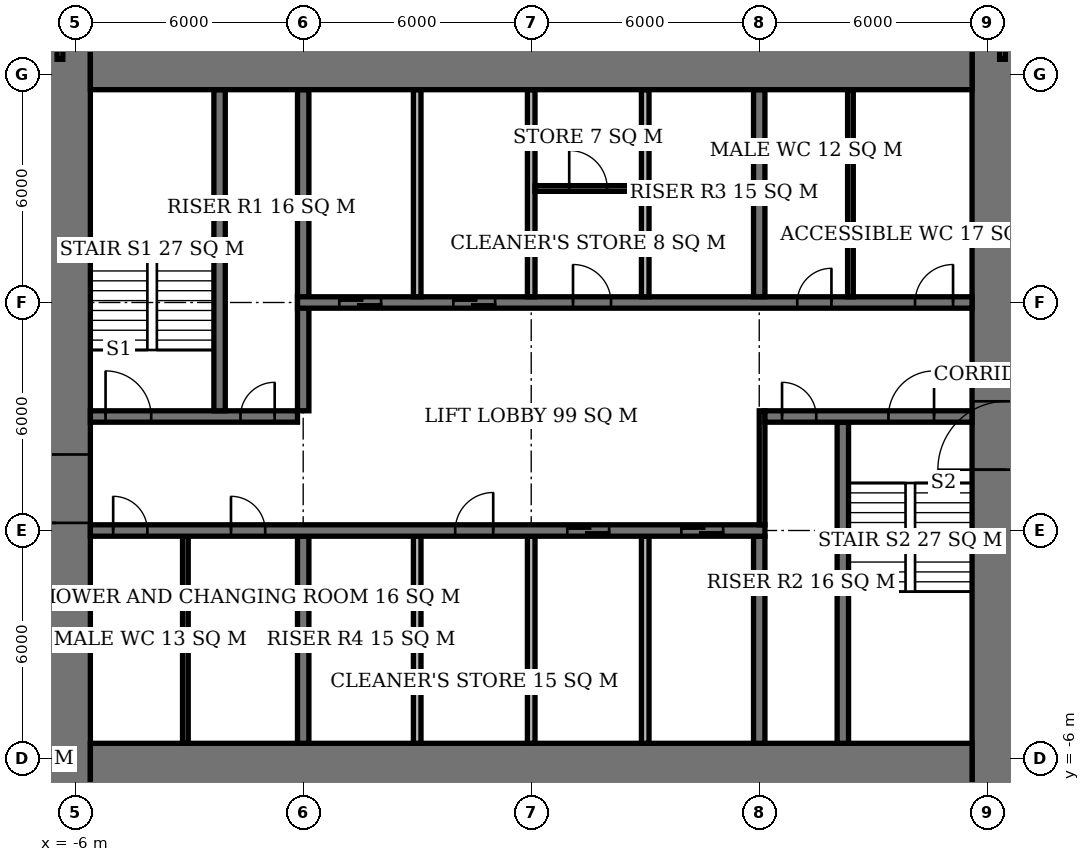
"""IFC4 building model, lengths in metres.
Left out: names, types, materials, properties, quantities, classifications, styles, units other than length and angle.
Written with IfcOpenShell. Run it as: python <this file> out.ifc"""

import sys

from ifc_helpers import new_model, si_unit, direction, frame, frame_2d, origin, place, context, subcontext, project, spatial, rectangle, extrude, element, fill, save


model = new_model("IFC4")
c1 = context("Model", 3, precision=1e-05, world=origin(), true_north=direction((0.0, 1.0)))
c2 = subcontext(c1, "Body", "Model", "MODEL_VIEW")
j1 = project(units=[si_unit("LENGTHUNIT", "METRE"), si_unit("PLANEANGLEUNIT", "RADIAN")], contexts=[c1])
p1 = place(None, origin())
s1 = spatial("IfcSite", under=j1, at=p1, CompositionType="ELEMENT")
p2 = place(p1, origin())
s2 = spatial("IfcBuilding", under=s1, at=p2, CompositionType="ELEMENT")
p3 = place(p2, frame((0.0, 0.0, 231.8)))
s3 = spatial("IfcBuildingStorey", under=s2, at=p3, CompositionType="ELEMENT", Elevation=231.8)
for number, where, z_axis, x_axis in (
    (1, (-5.6, -6.6, 0.0), (0.0, 0.0, 1.0), (1.0, 0.0, 0.0)),
    (2, (-5.6, 12.6, 0.0), (0.0, 0.0, 1.0), (1.0, 0.0, 0.0)),
):
    element("IfcWall", number, at=place(p3, frame(where, z_axis=z_axis, x_axis=x_axis)), inside=s3, PredefinedType="SHEAR", context=c2, shape_type="SweptSolid", body=[
        extrude(rectangle(XDim=23.2, YDim=2.0, at=frame_2d((11.6, 0.0))), origin(), (0.0, 0.0, 1.0), 3.9),
    ])
p4 = place(p3, frame((-6.5, -7.6, 0.0), z_axis=(0.0, 0.0, 1.0), x_axis=(0.0, 1.0, 0.0)))
e3 = element("IfcWall", 3, at=p4, inside=s3, PredefinedType="SHEAR", context=c2, shape_type="SweptSolid", body=[
    extrude(rectangle(XDim=21.2, YDim=1.8, at=frame_2d((10.6, 0.0))), origin(), (0.0, 0.0, 1.0), 3.9),
])
p5 = place(p4, frame((7.8, 0.0, 0.0)))
e4 = element("IfcOpeningElement", 4, at=p5, cuts=e3, PredefinedType="OPENING", context=c2, shape_type="SweptSolid", body=[
    extrude(rectangle(XDim=1.8, YDim=2.4, at=frame_2d((0.9, 1.2))), frame((0.0, 0.91, 0.0), z_axis=(0.0, -1.0, 0.0), x_axis=(1.0, 0.0, 0.0)), (0.0, 0.0, 1.0), 1.82),
])
p6 = place(p3, frame((18.5, -7.6, 0.0), z_axis=(0.0, 0.0, 1.0), x_axis=(0.0, 1.0, 0.0)))
e5 = element("IfcWall", 5, at=p6, inside=s3, PredefinedType="SHEAR", context=c2, shape_type="SweptSolid", body=[
    extrude(rectangle(XDim=21.2, YDim=1.8, at=frame_2d((10.6, 0.0))), origin(), (0.0, 0.0, 1.0), 3.9),
])
p7 = place(p6, frame((9.2, 0.0, 0.0)))
e6 = element("IfcOpeningElement", 6, at=p7, cuts=e5, PredefinedType="OPENING", context=c2, shape_type="SweptSolid", body=[
    extrude(rectangle(XDim=1.8, YDim=2.4, at=frame_2d((0.9, 1.2))), frame((0.0, 0.91, 0.0), z_axis=(0.0, -1.0, 0.0), x_axis=(1.0, 0.0, 0.0)), (0.0, 0.0, 1.0), 1.82),
])
p8 = place(p3, frame((-5.6, 0.0, 0.0), z_axis=(0.0, 0.0, 1.0), x_axis=(1.0, 0.0, 0.0)))
e7 = element("IfcWall", 7, at=p8, inside=s3, PredefinedType="SHEAR", context=c2, shape_type="SweptSolid", body=[
    extrude(rectangle(XDim=17.75, YDim=0.3, at=frame_2d((8.875, 0.0))), origin(), (0.0, 0.0, 1.0), 3.9),
])
p9 = place(p8, frame((0.6, 0.0, 0.0)))
e8 = element("IfcOpeningElement", 8, at=p9, cuts=e7, PredefinedType="OPENING", context=c2, shape_type="SweptSolid", body=[
    extrude(rectangle(XDim=0.9, YDim=2.1, at=frame_2d((0.45, 1.05))), frame((0.0, 0.16, 0.0), z_axis=(0.0, -1.0, 0.0), x_axis=(1.0, 0.0, 0.0)), (0.0, 0.0, 1.0), 0.32),
])
p10 = place(p8, frame((3.7, 0.0, 0.0)))
e9 = element("IfcOpeningElement", 9, at=p10, cuts=e7, PredefinedType="OPENING", context=c2, shape_type="SweptSolid", body=[
    extrude(rectangle(XDim=0.9, YDim=2.1, at=frame_2d((0.45, 1.05))), frame((0.0, 0.16, 0.0), z_axis=(0.0, -1.0, 0.0), x_axis=(1.0, 0.0, 0.0)), (0.0, 0.0, 1.0), 0.32),
])
p11 = place(p8, frame((9.6, 0.0, 0.0)))
e10 = element("IfcOpeningElement", 10, at=p11, cuts=e7, PredefinedType="OPENING", context=c2, shape_type="SweptSolid", body=[
    extrude(rectangle(XDim=1.0, YDim=2.1, at=frame_2d((0.5, 1.05))), frame((0.0, 0.16, 0.0), z_axis=(0.0, -1.0, 0.0), x_axis=(1.0, 0.0, 0.0)), (0.0, 0.0, 1.0), 0.32),
])
p12 = place(p8, frame((12.55, 0.0, 0.0)))
e11 = element("IfcOpeningElement", 11, at=p12, cuts=e7, PredefinedType="OPENING", context=c2, shape_type="SweptSolid", body=[
    extrude(rectangle(XDim=1.1, YDim=2.1, at=frame_2d((0.55, 1.05))), frame((0.0, 0.16, 0.0), z_axis=(0.0, -1.0, 0.0), x_axis=(1.0, 0.0, 0.0)), (0.0, 0.0, 1.0), 0.32),
])
p13 = place(p8, frame((15.55, 0.0, 0.0)))
e12 = element("IfcOpeningElement", 12, at=p13, cuts=e7, PredefinedType="OPENING", context=c2, shape_type="SweptSolid", body=[
    extrude(rectangle(XDim=1.1, YDim=2.1, at=frame_2d((0.55, 1.05))), frame((0.0, 0.16, 0.0), z_axis=(0.0, -1.0, 0.0), x_axis=(1.0, 0.0, 0.0)), (0.0, 0.0, 1.0), 0.32),
])
p14 = place(p3, frame((-5.6, 3.0, 0.0), z_axis=(0.0, 0.0, 1.0), x_axis=(1.0, 0.0, 0.0)))
e13 = element("IfcWall", 13, at=p14, inside=s3, PredefinedType="SHEAR", context=c2, shape_type="SweptSolid", body=[
    extrude(rectangle(XDim=5.45, YDim=0.3, at=frame_2d((2.725, 0.0))), origin(), (0.0, 0.0, 1.0), 3.9),
])
p15 = place(p14, frame((0.4, 0.0, 0.0)))
e14 = element("IfcOpeningElement", 14, at=p15, cuts=e13, PredefinedType="OPENING", context=c2, shape_type="SweptSolid", body=[
    extrude(rectangle(XDim=1.2, YDim=2.1, at=frame_2d((0.6, 1.05))), frame((0.0, 0.16, 0.0), z_axis=(0.0, -1.0, 0.0), x_axis=(1.0, 0.0, 0.0)), (0.0, 0.0, 1.0), 0.32),
])
p16 = place(p14, frame((3.95, 0.0, 0.0)))
e15 = element("IfcOpeningElement", 15, at=p16, cuts=e13, PredefinedType="OPENING", context=c2, shape_type="SweptSolid", body=[
    extrude(rectangle(XDim=0.9, YDim=2.1, at=frame_2d((0.45, 1.05))), frame((0.0, 0.16, 0.0), z_axis=(0.0, -1.0, 0.0), x_axis=(1.0, 0.0, 0.0)), (0.0, 0.0, 1.0), 0.32),
])
p17 = place(p3, frame((12.15, 3.0, 0.0), z_axis=(0.0, 0.0, 1.0), x_axis=(1.0, 0.0, 0.0)))
e16 = element("IfcWall", 16, at=p17, inside=s3, PredefinedType="SHEAR", context=c2, shape_type="SweptSolid", body=[
    extrude(rectangle(XDim=5.45, YDim=0.3, at=frame_2d((2.725, 0.0))), origin(), (0.0, 0.0, 1.0), 3.9),
])
p18 = place(p17, frame((3.25, 0.0, 0.0)))
e17 = element("IfcOpeningElement", 17, at=p18, cuts=e16, PredefinedType="OPENING", context=c2, shape_type="SweptSolid", body=[
    extrude(rectangle(XDim=1.2, YDim=2.1, at=frame_2d((0.6, 1.05))), frame((0.0, 0.16, 0.0), z_axis=(0.0, -1.0, 0.0), x_axis=(1.0, 0.0, 0.0)), (0.0, 0.0, 1.0), 0.32),
])
p19 = place(p17, frame((0.45, 0.0, 0.0)))
e18 = element("IfcOpeningElement", 18, at=p19, cuts=e16, PredefinedType="OPENING", context=c2, shape_type="SweptSolid", body=[
    extrude(rectangle(XDim=0.9, YDim=2.1, at=frame_2d((0.45, 1.05))), frame((0.0, 0.16, 0.0), z_axis=(0.0, -1.0, 0.0), x_axis=(1.0, 0.0, 0.0)), (0.0, 0.0, 1.0), 0.32),
])
p20 = place(p3, frame((-0.15, 6.0, 0.0), z_axis=(0.0, 0.0, 1.0), x_axis=(1.0, 0.0, 0.0)))
e19 = element("IfcWall", 19, at=p20, inside=s3, PredefinedType="SHEAR", context=c2, shape_type="SweptSolid", body=[
    extrude(rectangle(XDim=17.75, YDim=0.3, at=frame_2d((8.875, 0.0))), origin(), (0.0, 0.0, 1.0), 3.9),
])
p21 = place(p20, frame((13.15, 0.0, 0.0)))
e20 = element("IfcOpeningElement", 20, at=p21, cuts=e19, PredefinedType="OPENING", context=c2, shape_type="SweptSolid", body=[
    extrude(rectangle(XDim=0.9, YDim=2.1, at=frame_2d((0.45, 1.05))), frame((0.0, 0.16, 0.0), z_axis=(0.0, -1.0, 0.0), x_axis=(1.0, 0.0, 0.0)), (0.0, 0.0, 1.0), 0.32),
])
p22 = place(p20, frame((16.25, 0.0, 0.0)))
e21 = element("IfcOpeningElement", 21, at=p22, cuts=e19, PredefinedType="OPENING", context=c2, shape_type="SweptSolid", body=[
    extrude(rectangle(XDim=1.0, YDim=2.1, at=frame_2d((0.5, 1.05))), frame((0.0, 0.16, 0.0), z_axis=(0.0, -1.0, 0.0), x_axis=(1.0, 0.0, 0.0)), (0.0, 0.0, 1.0), 0.32),
])
p23 = place(p20, frame((7.25, 0.0, 0.0)))
e22 = element("IfcOpeningElement", 22, at=p23, cuts=e19, PredefinedType="OPENING", context=c2, shape_type="SweptSolid", body=[
    extrude(rectangle(XDim=1.0, YDim=2.1, at=frame_2d((0.5, 1.05))), frame((0.0, 0.16, 0.0), z_axis=(0.0, -1.0, 0.0), x_axis=(1.0, 0.0, 0.0)), (0.0, 0.0, 1.0), 0.32),
])
p24 = place(p20, frame((1.1, 0.0, 0.0)))
e23 = element("IfcOpeningElement", 23, at=p24, cuts=e19, PredefinedType="OPENING", context=c2, shape_type="SweptSolid", body=[
    extrude(rectangle(XDim=1.1, YDim=2.1, at=frame_2d((0.55, 1.05))), frame((0.0, 0.16, 0.0), z_axis=(0.0, -1.0, 0.0), x_axis=(1.0, 0.0, 0.0)), (0.0, 0.0, 1.0), 0.32),
])
p25 = place(p20, frame((4.1, 0.0, 0.0)))
e24 = element("IfcOpeningElement", 24, at=p25, cuts=e19, PredefinedType="OPENING", context=c2, shape_type="SweptSolid", body=[
    extrude(rectangle(XDim=1.1, YDim=2.1, at=frame_2d((0.55, 1.05))), frame((0.0, 0.16, 0.0), z_axis=(0.0, -1.0, 0.0), x_axis=(1.0, 0.0, 0.0)), (0.0, 0.0, 1.0), 0.32),
])
p26 = place(p3, frame((0.0, -5.6, 0.0), z_axis=(0.0, 0.0, 1.0), x_axis=(0.0, 1.0, 0.0)))
e25 = element("IfcWall", 25, at=p26, inside=s3, PredefinedType="SHEAR", context=c2, shape_type="SweptSolid", body=[
    extrude(rectangle(XDim=5.45, YDim=0.3, at=frame_2d((2.725, 0.0))), origin(), (0.0, 0.0, 1.0), 3.9),
])
p27 = place(p3, frame((0.0, 3.15, 0.0), z_axis=(0.0, 0.0, 1.0), x_axis=(0.0, 1.0, 0.0)))
e26 = element("IfcWall", 26, at=p27, inside=s3, PredefinedType="SHEAR", context=c2, shape_type="SweptSolid", body=[
    extrude(rectangle(XDim=8.45, YDim=0.3, at=frame_2d((4.225, 0.0))), origin(), (0.0, 0.0, 1.0), 3.9),
])
for number, where, z_axis, x_axis in (
    (27, (12.0, -5.6, 0.0), (0.0, 0.0, 1.0), (0.0, 1.0, 0.0)),
    (28, (12.0, 6.15, 0.0), (0.0, 0.0, 1.0), (0.0, 1.0, 0.0)),
):
    element("IfcWall", number, at=place(p3, frame(where, z_axis=z_axis, x_axis=x_axis)), inside=s3, PredefinedType="SHEAR", context=c2, shape_type="SweptSolid", body=[
        extrude(rectangle(XDim=5.45, YDim=0.3, at=frame_2d((2.725, 0.0))), origin(), (0.0, 0.0, 1.0), 3.9),
    ])
for number, where, z_axis, x_axis in (
    (29, (-2.2, 3.15, 0.0), (0.0, 0.0, 1.0), (0.0, 1.0, 0.0)),
    (30, (14.2, -5.6, 0.0), (0.0, 0.0, 1.0), (0.0, 1.0, 0.0)),
):
    element("IfcWall", number, at=place(p3, frame(where, z_axis=z_axis, x_axis=x_axis)), inside=s3, PredefinedType="SHEAR", context=c2, shape_type="SweptSolid", body=[
        extrude(rectangle(XDim=8.45, YDim=0.3, at=frame_2d((4.225, 0.0))), origin(), (0.0, 0.0, 1.0), 3.9),
    ])
for number, where, z_axis, x_axis in (
    (31, (3.0, 6.15, 0.0), (0.0, 0.0, 1.0), (0.0, 1.0, 0.0)),
    (32, (6.0, 6.15, 0.0), (0.0, 0.0, 1.0), (0.0, 1.0, 0.0)),
    (33, (9.0, 6.15, 0.0), (0.0, 0.0, 1.0), (0.0, 1.0, 0.0)),
    (34, (3.0, -5.6, 0.0), (0.0, 0.0, 1.0), (0.0, 1.0, 0.0)),
    (35, (6.0, -5.6, 0.0), (0.0, 0.0, 1.0), (0.0, 1.0, 0.0)),
    (36, (9.0, -5.6, 0.0), (0.0, 0.0, 1.0), (0.0, 1.0, 0.0)),
):
    element("IfcWall", number, at=place(p3, frame(where, z_axis=z_axis, x_axis=x_axis)), inside=s3, PredefinedType="SOLIDWALL", context=c2, shape_type="SweptSolid", body=[
        extrude(rectangle(XDim=5.45, YDim=0.2, at=frame_2d((2.725, 0.0))), origin(), (0.0, 0.0, 1.0), 3.9),
    ])
for number, where, z_axis, x_axis in (
    (37, (-3.1, -5.6, 0.0), (0.0, 0.0, 1.0), (0.0, 1.0, 0.0)),
    (38, (14.4, 6.15, 0.0), (0.0, 0.0, 1.0), (0.0, 1.0, 0.0)),
):
    element("IfcWall", number, at=place(p3, frame(where, z_axis=z_axis, x_axis=x_axis)), inside=s3, PredefinedType="PLUMBINGWALL", context=c2, shape_type="SweptSolid", body=[
        extrude(rectangle(XDim=5.45, YDim=0.15, at=frame_2d((2.725, 0.0))), origin(), (0.0, 0.0, 1.0), 3.65),
    ])
p28 = place(p3, frame((6.1, 9.0, 0.0), z_axis=(0.0, 0.0, 1.0), x_axis=(1.0, 0.0, 0.0)))
e39 = element("IfcWall", 39, at=p28, inside=s3, PredefinedType="PARTITIONING", context=c2, shape_type="SweptSolid", body=[
    extrude(rectangle(XDim=2.8, YDim=0.15, at=frame_2d((1.4, 0.0))), origin(), (0.0, 0.0, 1.0), 3.65),
])
p29 = place(p28, frame((0.9, 0.0, 0.0)))
e40 = element("IfcOpeningElement", 40, at=p29, cuts=e39, PredefinedType="OPENING", context=c2, shape_type="SweptSolid", body=[
    extrude(rectangle(XDim=1.0, YDim=2.1, at=frame_2d((0.5, 1.05))), frame((0.0, 0.085, 0.0), z_axis=(0.0, -1.0, 0.0), x_axis=(1.0, 0.0, 0.0)), (0.0, 0.0, 1.0), 0.17),
])
p30 = place(p3, frame((-6.4, 12.4, 0.0), z_axis=(0.0, 0.0, 1.0), x_axis=(0.0, 1.0, 0.0)))
e41 = element("IfcWall", 41, at=p30, inside=s3, PredefinedType="PARTITIONING", context=c2, shape_type="SweptSolid", body=[
    extrude(rectangle(XDim=1.2, YDim=0.15, at=frame_2d((0.6, 0.0))), origin(), (0.0, 0.0, 1.0), 3.65),
])
p31 = place(p3, frame((4.5, 12.4, 0.0), z_axis=(0.0, 0.0, 1.0), x_axis=(0.0, 1.0, 0.0)))
e42 = element("IfcWall", 42, at=p31, inside=s3, PredefinedType="PARTITIONING", context=c2, shape_type="SweptSolid", body=[
    extrude(rectangle(XDim=5.525, YDim=0.15, at=frame_2d((2.763, 0.0))), origin(), (0.0, 0.0, 1.0), 3.65),
])
p32 = place(p3, frame((18.4, 12.4, 0.0), z_axis=(0.0, 0.0, 1.0), x_axis=(0.0, 1.0, 0.0)))
e43 = element("IfcWall", 43, at=p32, inside=s3, PredefinedType="PARTITIONING", context=c2, shape_type="SweptSolid", body=[
    extrude(rectangle(XDim=1.2, YDim=0.15, at=frame_2d((0.6, 0.0))), origin(), (0.0, 0.0, 1.0), 3.65),
])
p33 = place(p3, frame((12.075, 0.15, 0.0), z_axis=(0.0, 0.0, 1.0), x_axis=(0.0, 1.0, 0.0)))
e44 = element("IfcWall", 44, at=p33, inside=s3, PredefinedType="PARTITIONING", context=c2, shape_type="SweptSolid", body=[
    extrude(rectangle(XDim=3.0, YDim=0.15, at=frame_2d((1.5, 0.0))), origin(), (0.0, 0.0, 1.0), 3.65),
])
p34 = place(p5, origin())
e45 = element("IfcDoor", 45, at=p34, inside=s3, OperationType="DOUBLE_DOOR_SINGLE_SWING", PredefinedType="DOOR", context=c2, shape_type="SweptSolid", body=[
    extrude(rectangle(XDim=1.8, YDim=2.4, at=frame_2d((0.9, 1.2))), frame((0.0, 0.025, 0.0), z_axis=(0.0, -1.0, 0.0), x_axis=(1.0, 0.0, 0.0)), (0.0, 0.0, 1.0), 0.05),
])
fill(e4, e45)
p35 = place(p7, origin())
e46 = element("IfcDoor", 46, at=p35, inside=s3, OperationType="DOUBLE_DOOR_SINGLE_SWING", PredefinedType="DOOR", context=c2, shape_type="SweptSolid", body=[
    extrude(rectangle(XDim=1.8, YDim=2.4, at=frame_2d((0.9, 1.2))), frame((0.0, 0.025, 0.0), z_axis=(0.0, -1.0, 0.0), x_axis=(1.0, 0.0, 0.0)), (0.0, 0.0, 1.0), 0.05),
])
fill(e6, e46)
p36 = place(p15, origin())
e47 = element("IfcDoor", 47, at=p36, inside=s3, OperationType="SINGLE_SWING_LEFT", PredefinedType="DOOR", context=c2, shape_type="SweptSolid", body=[
    extrude(rectangle(XDim=1.2, YDim=2.1, at=frame_2d((0.6, 1.05))), frame((0.0, 0.025, 0.0), z_axis=(0.0, -1.0, 0.0), x_axis=(1.0, 0.0, 0.0)), (0.0, 0.0, 1.0), 0.05),
])
fill(e14, e47)
p37 = place(p16, origin())
e48 = element("IfcDoor", 48, at=p37, inside=s3, OperationType="SINGLE_SWING_RIGHT", PredefinedType="DOOR", context=c2, shape_type="SweptSolid", body=[
    extrude(rectangle(XDim=0.9, YDim=2.1, at=frame_2d((0.45, 1.05))), frame((0.0, 0.025, 0.0), z_axis=(0.0, -1.0, 0.0), x_axis=(1.0, 0.0, 0.0)), (0.0, 0.0, 1.0), 0.05),
])
fill(e15, e48)
p38 = place(p18, origin())
e49 = element("IfcDoor", 49, at=p38, inside=s3, OperationType="SINGLE_SWING_RIGHT", PredefinedType="DOOR", context=c2, shape_type="SweptSolid", body=[
    extrude(rectangle(XDim=1.2, YDim=2.1, at=frame_2d((0.6, 1.05))), frame((0.0, 0.025, 0.0), z_axis=(0.0, -1.0, 0.0), x_axis=(1.0, 0.0, 0.0)), (0.0, 0.0, 1.0), 0.05),
])
fill(e17, e49)
p39 = place(p19, origin())
e50 = element("IfcDoor", 50, at=p39, inside=s3, OperationType="SINGLE_SWING_LEFT", PredefinedType="DOOR", context=c2, shape_type="SweptSolid", body=[
    extrude(rectangle(XDim=0.9, YDim=2.1, at=frame_2d((0.45, 1.05))), frame((0.0, 0.025, 0.0), z_axis=(0.0, -1.0, 0.0), x_axis=(1.0, 0.0, 0.0)), (0.0, 0.0, 1.0), 0.05),
])
fill(e18, e50)
p40 = place(p9, origin())
e51 = element("IfcDoor", 51, at=p40, inside=s3, OperationType="SINGLE_SWING_LEFT", PredefinedType="DOOR", context=c2, shape_type="SweptSolid", body=[
    extrude(rectangle(XDim=0.9, YDim=2.1, at=frame_2d((0.45, 1.05))), frame((0.0, 0.025, 0.0), z_axis=(0.0, -1.0, 0.0), x_axis=(1.0, 0.0, 0.0)), (0.0, 0.0, 1.0), 0.05),
])
fill(e8, e51)
p41 = place(p10, origin())
e52 = element("IfcDoor", 52, at=p41, inside=s3, OperationType="SINGLE_SWING_LEFT", PredefinedType="DOOR", context=c2, shape_type="SweptSolid", body=[
    extrude(rectangle(XDim=0.9, YDim=2.1, at=frame_2d((0.45, 1.05))), frame((0.0, 0.025, 0.0), z_axis=(0.0, -1.0, 0.0), x_axis=(1.0, 0.0, 0.0)), (0.0, 0.0, 1.0), 0.05),
])
fill(e9, e52)
p42 = place(p21, origin())
e53 = element("IfcDoor", 53, at=p42, inside=s3, OperationType="SINGLE_SWING_RIGHT", PredefinedType="DOOR", context=c2, shape_type="SweptSolid", body=[
    extrude(rectangle(XDim=0.9, YDim=2.1, at=frame_2d((0.45, 1.05))), frame((0.0, 0.025, 0.0), z_axis=(0.0, -1.0, 0.0), x_axis=(1.0, 0.0, 0.0)), (0.0, 0.0, 1.0), 0.05),
])
fill(e20, e53)
p43 = place(p22, origin())
e54 = element("IfcDoor", 54, at=p43, inside=s3, OperationType="SINGLE_SWING_RIGHT", PredefinedType="DOOR", context=c2, shape_type="SweptSolid", body=[
    extrude(rectangle(XDim=1.0, YDim=2.1, at=frame_2d((0.5, 1.05))), frame((0.0, 0.025, 0.0), z_axis=(0.0, -1.0, 0.0), x_axis=(1.0, 0.0, 0.0)), (0.0, 0.0, 1.0), 0.05),
])
fill(e21, e54)
p44 = place(p29, origin())
e55 = element("IfcDoor", 55, at=p44, inside=s3, OperationType="SINGLE_SWING_LEFT", PredefinedType="DOOR", context=c2, shape_type="SweptSolid", body=[
    extrude(rectangle(XDim=1.0, YDim=2.1, at=frame_2d((0.5, 1.05))), frame((0.0, 0.025, 0.0), z_axis=(0.0, -1.0, 0.0), x_axis=(1.0, 0.0, 0.0)), (0.0, 0.0, 1.0), 0.05),
])
fill(e40, e55)
p45 = place(p23, origin())
e56 = element("IfcDoor", 56, at=p45, inside=s3, OperationType="SINGLE_SWING_LEFT", PredefinedType="DOOR", context=c2, shape_type="SweptSolid", body=[
    extrude(rectangle(XDim=1.0, YDim=2.1, at=frame_2d((0.5, 1.05))), frame((0.0, 0.025, 0.0), z_axis=(0.0, -1.0, 0.0), x_axis=(1.0, 0.0, 0.0)), (0.0, 0.0, 1.0), 0.05),
])
fill(e22, e56)
p46 = place(p11, origin())
e57 = element("IfcDoor", 57, at=p46, inside=s3, OperationType="SINGLE_SWING_RIGHT", PredefinedType="DOOR", context=c2, shape_type="SweptSolid", body=[
    extrude(rectangle(XDim=1.0, YDim=2.1, at=frame_2d((0.5, 1.05))), frame((0.0, 0.025, 0.0), z_axis=(0.0, -1.0, 0.0), x_axis=(1.0, 0.0, 0.0)), (0.0, 0.0, 1.0), 0.05),
])
fill(e10, e57)
p47 = place(p24, origin())
e58 = element("IfcDoor", 58, at=p47, inside=s3, OperationType="DOUBLE_DOOR_SLIDING", PredefinedType="USERDEFINED", context=c2, shape_type="SweptSolid", body=[
    extrude(rectangle(XDim=1.1, YDim=2.1, at=frame_2d((0.55, 1.05))), frame((0.0, 0.025, 0.0), z_axis=(0.0, -1.0, 0.0), x_axis=(1.0, 0.0, 0.0)), (0.0, 0.0, 1.0), 0.05),
])
fill(e23, e58)
p48 = place(p25, origin())
e59 = element("IfcDoor", 59, at=p48, inside=s3, OperationType="DOUBLE_DOOR_SLIDING", PredefinedType="USERDEFINED", context=c2, shape_type="SweptSolid", body=[
    extrude(rectangle(XDim=1.1, YDim=2.1, at=frame_2d((0.55, 1.05))), frame((0.0, 0.025, 0.0), z_axis=(0.0, -1.0, 0.0), x_axis=(1.0, 0.0, 0.0)), (0.0, 0.0, 1.0), 0.05),
])
fill(e24, e59)
p49 = place(p12, origin())
e60 = element("IfcDoor", 60, at=p49, inside=s3, OperationType="DOUBLE_DOOR_SLIDING", PredefinedType="USERDEFINED", context=c2, shape_type="SweptSolid", body=[
    extrude(rectangle(XDim=1.1, YDim=2.1, at=frame_2d((0.55, 1.05))), frame((0.0, 0.025, 0.0), z_axis=(0.0, -1.0, 0.0), x_axis=(1.0, 0.0, 0.0)), (0.0, 0.0, 1.0), 0.05),
])
fill(e11, e60)
p50 = place(p13, origin())
e61 = element("IfcDoor", 61, at=p50, inside=s3, OperationType="DOUBLE_DOOR_SLIDING", PredefinedType="USERDEFINED", context=c2, shape_type="SweptSolid", body=[
    extrude(rectangle(XDim=1.1, YDim=2.1, at=frame_2d((0.55, 1.05))), frame((0.0, 0.025, 0.0), z_axis=(0.0, -1.0, 0.0), x_axis=(1.0, 0.0, 0.0)), (0.0, 0.0, 1.0), 0.05),
])
fill(e12, e61)
save(model, sys.argv[1])
